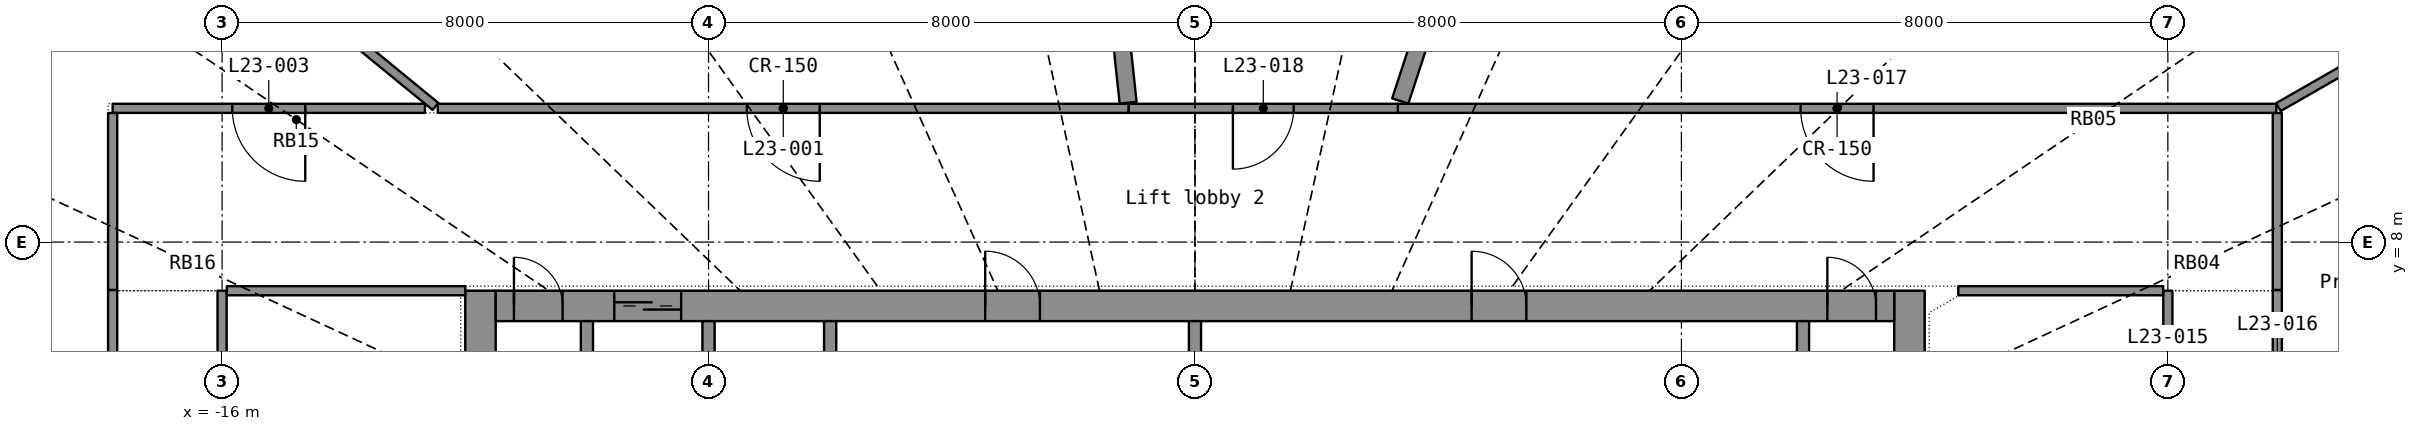
"""IFC4 building model, lengths in metres.
Left out: names, types, materials, properties, quantities, classifications, styles, units other than length and angle.
Written with IfcOpenShell. Run it as: python <this file> out.ifc"""

import sys

from ifc_helpers import new_model, si_unit, direction, frame, frame_2d, origin, place, context, subcontext, project, spatial, rectangle, extrude, element, fill, save


model = new_model("IFC4")
c1 = context("Model", 3, precision=1e-05, world=origin(), true_north=direction((0.0, 1.0)))
c2 = subcontext(c1, "Body", "Model", "MODEL_VIEW")
j1 = project(units=[si_unit("LENGTHUNIT", "METRE"), si_unit("PLANEANGLEUNIT", "RADIAN")], contexts=[c1])
p1 = place(None, origin())
s1 = spatial("IfcSite", under=j1, at=p1, CompositionType="ELEMENT")
p2 = place(p1, origin())
s2 = spatial("IfcBuilding", under=s1, at=p2, CompositionType="ELEMENT")
p3 = place(p2, frame((0.0, 0.0, 100.8)))
s3 = spatial("IfcBuildingStorey", under=s2, at=p3, CompositionType="ELEMENT", Elevation=100.8)
p4 = place(p3, frame((-11.75, -7.2, 0.0), z_axis=(0.0, 0.0, 1.0), x_axis=(0.0, 1.0, 0.0)))
e1 = element("IfcWall", 1, at=p4, inside=s3, PredefinedType="SHEAR", context=c2, shape_type="SweptSolid", body=[
    extrude(rectangle(XDim=14.4, YDim=0.5, at=frame_2d((7.2, 0.0))), origin(), (0.0, 0.0, 1.0), 3.3),
])
p5 = place(p4, frame((6.5, 0.0, 0.0)))
e2 = element("IfcOpeningElement", 2, at=p5, cuts=e1, PredefinedType="OPENING", context=c2, shape_type="SweptSolid", body=[
    extrude(rectangle(XDim=1.4, YDim=2.2, at=frame_2d((0.7, 1.1))), frame((0.0, 0.26, 0.0), z_axis=(0.0, -1.0, 0.0), x_axis=(1.0, 0.0, 0.0)), (0.0, 0.0, 1.0), 0.52),
])
p6 = place(p3, frame((11.75, -7.2, 0.0), z_axis=(0.0, 0.0, 1.0), x_axis=(0.0, 1.0, 0.0)))
e3 = element("IfcWall", 3, at=p6, inside=s3, PredefinedType="SHEAR", context=c2, shape_type="SweptSolid", body=[
    extrude(rectangle(XDim=14.4, YDim=0.5, at=frame_2d((7.2, 0.0))), origin(), (0.0, 0.0, 1.0), 3.3),
])
p7 = place(p6, frame((6.5, 0.0, 0.0)))
e4 = element("IfcOpeningElement", 4, at=p7, cuts=e3, PredefinedType="OPENING", context=c2, shape_type="SweptSolid", body=[
    extrude(rectangle(XDim=1.4, YDim=2.2, at=frame_2d((0.7, 1.1))), frame((0.0, 0.26, 0.0), z_axis=(0.0, -1.0, 0.0), x_axis=(1.0, 0.0, 0.0)), (0.0, 0.0, 1.0), 0.52),
])
p8 = place(p3, frame((-11.5, 6.95, 0.0), z_axis=(0.0, 0.0, 1.0), x_axis=(1.0, 0.0, 0.0)))
e5 = element("IfcWall", 5, at=p8, inside=s3, PredefinedType="SHEAR", context=c2, shape_type="SweptSolid", body=[
    extrude(rectangle(XDim=23.0, YDim=0.5, at=frame_2d((11.5, 0.0))), origin(), (0.0, 0.0, 1.0), 3.3),
])
p9 = place(p8, frame((1.95, 0.0, 0.0)))
e6 = element("IfcOpeningElement", 6, at=p9, cuts=e5, PredefinedType="OPENING", context=c2, shape_type="SweptSolid", body=[
    extrude(rectangle(XDim=1.1, YDim=2.2, at=frame_2d((0.55, 1.1))), frame((0.0, 0.26, 0.0), z_axis=(0.0, -1.0, 0.0), x_axis=(1.0, 0.0, 0.0)), (0.0, 0.0, 1.0), 0.52),
])
p10 = place(p8, frame((8.05, 0.0, 0.0)))
e7 = element("IfcOpeningElement", 7, at=p10, cuts=e5, PredefinedType="OPENING", context=c2, shape_type="SweptSolid", body=[
    extrude(rectangle(XDim=0.9, YDim=2.1, at=frame_2d((0.45, 1.05))), frame((0.0, 0.26, 0.0), z_axis=(0.0, -1.0, 0.0), x_axis=(1.0, 0.0, 0.0)), (0.0, 0.0, 1.0), 0.52),
])
p11 = place(p8, frame((16.05, 0.0, 0.0)))
e8 = element("IfcOpeningElement", 8, at=p11, cuts=e5, PredefinedType="OPENING", context=c2, shape_type="SweptSolid", body=[
    extrude(rectangle(XDim=0.9, YDim=2.1, at=frame_2d((0.45, 1.05))), frame((0.0, 0.26, 0.0), z_axis=(0.0, -1.0, 0.0), x_axis=(1.0, 0.0, 0.0)), (0.0, 0.0, 1.0), 0.52),
])
p12 = place(p8, frame((0.3, 0.0, 0.0)))
e9 = element("IfcOpeningElement", 9, at=p12, cuts=e5, PredefinedType="OPENING", context=c2, shape_type="SweptSolid", body=[
    extrude(rectangle(XDim=0.8, YDim=2.05, at=frame_2d((0.4, 1.025))), frame((0.0, 0.26, 0.0), z_axis=(0.0, -1.0, 0.0), x_axis=(1.0, 0.0, 0.0)), (0.0, 0.0, 1.0), 0.52),
])
p13 = place(p8, frame((21.9, 0.0, 0.0)))
e10 = element("IfcOpeningElement", 10, at=p13, cuts=e5, PredefinedType="OPENING", context=c2, shape_type="SweptSolid", body=[
    extrude(rectangle(XDim=0.8, YDim=2.05, at=frame_2d((0.4, 1.025))), frame((0.0, 0.26, 0.0), z_axis=(0.0, -1.0, 0.0), x_axis=(1.0, 0.0, 0.0)), (0.0, 0.0, 1.0), 0.52),
])
for number, where, z_axis, x_axis in (
    (11, (-10.0, 3.9, 0.0), (0.0, 0.0, 1.0), (0.0, 1.0, 0.0)),
    (12, (-8.0, 3.9, 0.0), (0.0, 0.0, 1.0), (0.0, 1.0, 0.0)),
    (13, (-6.0, 3.9, 0.0), (0.0, 0.0, 1.0), (0.0, 1.0, 0.0)),
    (14, (10.0, 3.9, 0.0), (0.0, 0.0, 1.0), (0.0, 1.0, 0.0)),
):
    element("IfcWall", number, at=place(p3, frame(where, z_axis=z_axis, x_axis=x_axis)), inside=s3, PredefinedType="SHEAR", context=c2, shape_type="SweptSolid", body=[
        extrude(rectangle(XDim=2.8, YDim=0.2, at=frame_2d((1.4, 0.0))), origin(), (0.0, 0.0, 1.0), 3.3),
    ])
p14 = place(p3, frame((0.0, 3.9, 0.0), z_axis=(0.0, 0.0, 1.0), x_axis=(0.0, 1.0, 0.0)))
e15 = element("IfcWall", 15, at=p14, inside=s3, PredefinedType="PARTITIONING", context=c2, shape_type="SweptSolid", body=[
    extrude(rectangle(XDim=2.8, YDim=0.2, at=frame_2d((1.4, 0.0))), origin(), (0.0, 0.0, 1.0), 3.3),
])
p15 = place(p3, frame((17.784, 10.2, 0.0), z_axis=(0.0, 0.0, 1.0), x_axis=(-1.0, 0.0, 0.0)))
e16 = element("IfcWall", 16, at=p15, inside=s3, PredefinedType="PARTITIONING", context=c2, shape_type="SweptSolid", body=[
    extrude(rectangle(XDim=14.447, YDim=0.15, at=frame_2d((7.224, 0.0))), origin(), (0.0, 0.0, 1.0), 2.4),
])
p16 = place(p15, frame((6.624, 0.0, 0.0)))
e17 = element("IfcOpeningElement", 17, at=p16, cuts=e16, PredefinedType="OPENING", context=c2, shape_type="SweptSolid", body=[
    extrude(rectangle(XDim=1.2, YDim=2.2, at=frame_2d((0.6, 1.1))), frame((0.0, 0.085, 0.0), z_axis=(0.0, -1.0, 0.0), x_axis=(1.0, 0.0, 0.0)), (0.0, 0.0, 1.0), 0.17),
])
p17 = place(p3, frame((-1.089, 10.2, 0.0), z_axis=(0.0, 0.0, 1.0), x_axis=(-1.0, 0.0, 0.0)))
e18 = element("IfcWall", 18, at=p17, inside=s3, PredefinedType="PARTITIONING", context=c2, shape_type="SweptSolid", body=[
    extrude(rectangle(XDim=11.363, YDim=0.15, at=frame_2d((5.682, 0.0))), origin(), (0.0, 0.0, 1.0), 2.4),
])
p18 = place(p17, frame((5.082, 0.0, 0.0)))
e19 = element("IfcOpeningElement", 19, at=p18, cuts=e18, PredefinedType="OPENING", context=c2, shape_type="SweptSolid", body=[
    extrude(rectangle(XDim=1.2, YDim=2.2, at=frame_2d((0.6, 1.1))), frame((0.0, 0.085, 0.0), z_axis=(0.0, -1.0, 0.0), x_axis=(1.0, 0.0, 0.0)), (0.0, 0.0, 1.0), 0.17),
])
p19 = place(p3, frame((-1.099, 10.292, 0.0), z_axis=(0.0, 0.0, 1.0), x_axis=(-0.106202827, 0.994344487, 0.0)))
e20 = element("IfcWall", 20, at=p19, inside=s3, PredefinedType="PARTITIONING", context=c2, shape_type="SweptSolid", body=[
    extrude(rectangle(XDim=10.857, YDim=0.28, at=frame_2d((5.429, 0.0))), origin(), (0.0, 0.0, 1.0), 2.4),
])
p20 = place(p19, frame((4.679, 0.0, 1.0)))
e21 = element("IfcOpeningElement", 21, at=p20, cuts=e20, PredefinedType="OPENING", context=c2, shape_type="SweptSolid", body=[
    extrude(rectangle(XDim=1.5, YDim=1.2, at=frame_2d((0.75, 0.6))), frame((0.0, 0.15, 0.0), z_axis=(0.0, -1.0, 0.0), x_axis=(1.0, 0.0, 0.0)), (0.0, 0.0, 1.0), 0.3),
])
p21 = place(p3, frame((6.689, 20.448, 0.0), z_axis=(0.0, 0.0, 1.0), x_axis=(-0.310888923, -0.950446252, 0.0)))
e22 = element("IfcWall", 22, at=p21, inside=s3, PredefinedType="PARTITIONING", context=c2, shape_type="SweptSolid", body=[
    extrude(rectangle(XDim=10.656, YDim=0.28, at=frame_2d((5.328, 0.0))), origin(), (0.0, 0.0, 1.0), 2.4),
])
p22 = place(p3, frame((-17.8, 7.212, 0.0), z_axis=(0.0, 0.0, 1.0), x_axis=(0.0, -1.0, 0.0)))
e23 = element("IfcWall", 23, at=p22, inside=s3, PredefinedType="PARTITIONING", context=c2, shape_type="SweptSolid", body=[
    extrude(rectangle(XDim=8.488, YDim=0.15, at=frame_2d((4.244, 0.0))), origin(), (0.0, 0.0, 1.0), 2.4),
])
p23 = place(p22, frame((3.644, 0.0, 0.0)))
e24 = element("IfcOpeningElement", 24, at=p23, cuts=e23, PredefinedType="OPENING", context=c2, shape_type="SweptSolid", body=[
    extrude(rectangle(XDim=1.2, YDim=2.2, at=frame_2d((0.6, 1.1))), frame((0.0, 0.085, 0.0), z_axis=(0.0, -1.0, 0.0), x_axis=(1.0, 0.0, 0.0)), (0.0, 0.0, 1.0), 0.17),
])
p24 = place(p3, frame((-18.283, 14.976, 0.0), z_axis=(0.0, 0.0, 1.0), x_axis=(0.773592541, -0.633683344, 0.0)))
e25 = element("IfcWall", 25, at=p24, inside=s3, PredefinedType="PARTITIONING", context=c2, shape_type="SweptSolid", body=[
    extrude(rectangle(XDim=7.488, YDim=0.15, at=frame_2d((3.744, 0.0))), origin(), (0.0, 0.0, 1.0), 2.4),
])
p25 = place(p3, frame((-16.0, 0.9, 0.0), z_axis=(0.0, 0.0, 1.0), x_axis=(0.0, 1.0, 0.0)))
e26 = element("IfcWall", 26, at=p25, inside=s3, PredefinedType="PARTITIONING", context=c2, shape_type="SweptSolid", body=[
    extrude(rectangle(XDim=6.3, YDim=0.15, at=frame_2d((3.15, 0.0))), origin(), (0.0, 0.0, 1.0), 2.4),
])
p26 = place(p25, frame((2.55, 0.0, 0.0)))
e27 = element("IfcOpeningElement", 27, at=p26, cuts=e26, PredefinedType="OPENING", context=c2, shape_type="SweptSolid", body=[
    extrude(rectangle(XDim=1.2, YDim=2.2, at=frame_2d((0.6, 1.1))), frame((0.0, 0.085, 0.0), z_axis=(0.0, -1.0, 0.0), x_axis=(1.0, 0.0, 0.0)), (0.0, 0.0, 1.0), 0.17),
])
p27 = place(p3, frame((-12.665, 10.2, 0.0), z_axis=(0.0, 0.0, 1.0), x_axis=(-1.0, 0.0, 0.0)))
e28 = element("IfcWall", 28, at=p27, inside=s3, PredefinedType="PARTITIONING", context=c2, shape_type="SweptSolid", body=[
    extrude(rectangle(XDim=5.135, YDim=0.15, at=frame_2d((2.568, 0.0))), origin(), (0.0, 0.0, 1.0), 2.4),
])
p28 = place(p27, frame((1.968, 0.0, 0.0)))
e29 = element("IfcOpeningElement", 29, at=p28, cuts=e28, PredefinedType="OPENING", context=c2, shape_type="SweptSolid", body=[
    extrude(rectangle(XDim=1.2, YDim=2.2, at=frame_2d((0.6, 1.1))), frame((0.0, 0.085, 0.0), z_axis=(0.0, -1.0, 0.0), x_axis=(1.0, 0.0, 0.0)), (0.0, 0.0, 1.0), 0.17),
])
p29 = place(p3, frame((3.336, 10.2, 0.0), z_axis=(0.0, 0.0, 1.0), x_axis=(-1.0, 0.0, 0.0)))
e30 = element("IfcWall", 30, at=p29, inside=s3, PredefinedType="PARTITIONING", context=c2, shape_type="SweptSolid", body=[
    extrude(rectangle(XDim=4.424, YDim=0.15, at=frame_2d((2.212, 0.0))), origin(), (0.0, 0.0, 1.0), 2.4),
])
p30 = place(p29, frame((1.712, 0.0, 0.0)))
e31 = element("IfcOpeningElement", 31, at=p30, cuts=e30, PredefinedType="OPENING", context=c2, shape_type="SweptSolid", body=[
    extrude(rectangle(XDim=1.0, YDim=2.2, at=frame_2d((0.5, 1.1))), frame((0.0, 0.085, 0.0), z_axis=(0.0, -1.0, 0.0), x_axis=(1.0, 0.0, 0.0)), (0.0, 0.0, 1.0), 0.17),
])
p31 = place(p3, frame((-15.923, 7.2, 0.0), z_axis=(0.0, 0.0, 1.0), x_axis=(1.0, 0.0, 0.0)))
e32 = element("IfcWall", 32, at=p31, inside=s3, PredefinedType="PARTITIONING", context=c2, shape_type="SweptSolid", body=[
    extrude(rectangle(XDim=3.923, YDim=0.15, at=frame_2d((1.961, 0.0))), origin(), (0.0, 0.0, 1.0), 2.4),
])
p32 = place(p3, frame((21.183, 12.149, 0.0), z_axis=(0.0, 0.0, 1.0), x_axis=(-0.867451833, -0.497521173, 0.0)))
e33 = element("IfcWall", 33, at=p32, inside=s3, PredefinedType="PARTITIONING", context=c2, shape_type="SweptSolid", body=[
    extrude(rectangle(XDim=3.879, YDim=0.15, at=frame_2d((1.939, 0.0))), origin(), (0.0, 0.0, 1.0), 2.4),
])
p33 = place(p3, frame((16.0, 7.2, 0.0), z_axis=(0.0, 0.0, 1.0), x_axis=(0.0, -1.0, 0.0)))
e34 = element("IfcWall", 34, at=p33, inside=s3, PredefinedType="PARTITIONING", context=c2, shape_type="SweptSolid", body=[
    extrude(rectangle(XDim=3.55, YDim=0.15, at=frame_2d((1.775, 0.0))), origin(), (0.0, 0.0, 1.0), 2.4),
])
p34 = place(p33, frame((1.3, 0.0, 0.0)))
e35 = element("IfcOpeningElement", 35, at=p34, cuts=e34, PredefinedType="OPENING", context=c2, shape_type="SweptSolid", body=[
    extrude(rectangle(XDim=0.95, YDim=2.15, at=frame_2d((0.475, 1.075))), frame((0.0, 0.085, 0.0), z_axis=(0.0, -1.0, 0.0), x_axis=(1.0, 0.0, 0.0)), (0.0, 0.0, 1.0), 0.17),
])
p35 = place(p3, frame((12.553, 7.2, 0.0), z_axis=(0.0, 0.0, 1.0), x_axis=(1.0, 0.0, 0.0)))
e36 = element("IfcWall", 36, at=p35, inside=s3, PredefinedType="PARTITIONING", context=c2, shape_type="SweptSolid", body=[
    extrude(rectangle(XDim=3.37, YDim=0.15, at=frame_2d((1.685, 0.0))), origin(), (0.0, 0.0, 1.0), 2.4),
])
p36 = place(p3, frame((17.8, 4.069, 0.0), z_axis=(0.0, 0.0, 1.0), x_axis=(0.0, 1.0, 0.0)))
e37 = element("IfcWall", 37, at=p36, inside=s3, PredefinedType="PARTITIONING", context=c2, shape_type="SweptSolid", body=[
    extrude(rectangle(XDim=3.143, YDim=0.15, at=frame_2d((1.572, 0.0))), origin(), (0.0, 0.0, 1.0), 2.4),
])
p37 = place(p36, frame((1.097, 0.0, 0.0)))
e38 = element("IfcOpeningElement", 38, at=p37, cuts=e37, PredefinedType="OPENING", context=c2, shape_type="SweptSolid", body=[
    extrude(rectangle(XDim=0.95, YDim=2.15, at=frame_2d((0.475, 1.075))), frame((0.0, 0.085, 0.0), z_axis=(0.0, -1.0, 0.0), x_axis=(1.0, 0.0, 0.0)), (0.0, 0.0, 1.0), 0.17),
])
for number, where, z_axis, x_axis in (
    (39, (17.8, 7.213, 0.0), (0.0, 0.0, 1.0), (0.0, 1.0, 0.0)),
    (40, (-17.8, 10.123, 0.0), (0.0, 0.0, 1.0), (0.0, -1.0, 0.0)),
):
    element("IfcWall", number, at=place(p3, frame(where, z_axis=z_axis, x_axis=x_axis)), inside=s3, PredefinedType="PARTITIONING", context=c2, shape_type="SweptSolid", body=[
        extrude(rectangle(XDim=2.91, YDim=0.15, at=frame_2d((1.455, 0.0))), origin(), (0.0, 0.0, 1.0), 2.4),
    ])
p38 = place(p9, origin())
e41 = element("IfcDoor", 41, at=p38, inside=s3, OperationType="DOUBLE_DOOR_SLIDING", PredefinedType="DOOR", context=c2, shape_type="SweptSolid", body=[
    extrude(rectangle(XDim=1.1, YDim=2.2, at=frame_2d((0.55, 1.1))), frame((0.0, 0.025, 0.0), z_axis=(0.0, -1.0, 0.0), x_axis=(1.0, 0.0, 0.0)), (0.0, 0.0, 1.0), 0.05),
])
fill(e6, e41)
p39 = place(p10, origin())
e42 = element("IfcDoor", 42, at=p39, inside=s3, OperationType="SINGLE_SWING_LEFT", PredefinedType="DOOR", context=c2, shape_type="SweptSolid", body=[
    extrude(rectangle(XDim=0.9, YDim=2.1, at=frame_2d((0.45, 1.05))), frame((0.0, 0.025, 0.0), z_axis=(0.0, -1.0, 0.0), x_axis=(1.0, 0.0, 0.0)), (0.0, 0.0, 1.0), 0.05),
])
fill(e7, e42)
p40 = place(p11, origin())
e43 = element("IfcDoor", 43, at=p40, inside=s3, OperationType="SINGLE_SWING_LEFT", PredefinedType="DOOR", context=c2, shape_type="SweptSolid", body=[
    extrude(rectangle(XDim=0.9, YDim=2.1, at=frame_2d((0.45, 1.05))), frame((0.0, 0.025, 0.0), z_axis=(0.0, -1.0, 0.0), x_axis=(1.0, 0.0, 0.0)), (0.0, 0.0, 1.0), 0.05),
])
fill(e8, e43)
p41 = place(p12, origin())
e44 = element("IfcDoor", 44, at=p41, inside=s3, OperationType="SINGLE_SWING_LEFT", PredefinedType="DOOR", context=c2, shape_type="SweptSolid", body=[
    extrude(rectangle(XDim=0.8, YDim=2.05, at=frame_2d((0.4, 1.025))), frame((0.0, 0.025, 0.0), z_axis=(0.0, -1.0, 0.0), x_axis=(1.0, 0.0, 0.0)), (0.0, 0.0, 1.0), 0.05),
])
fill(e9, e44)
p42 = place(p13, origin())
e45 = element("IfcDoor", 45, at=p42, inside=s3, OperationType="SINGLE_SWING_LEFT", PredefinedType="DOOR", context=c2, shape_type="SweptSolid", body=[
    extrude(rectangle(XDim=0.8, YDim=2.05, at=frame_2d((0.4, 1.025))), frame((0.0, 0.025, 0.0), z_axis=(0.0, -1.0, 0.0), x_axis=(1.0, 0.0, 0.0)), (0.0, 0.0, 1.0), 0.05),
])
fill(e10, e45)
p43 = place(p18, origin())
e46 = element("IfcDoor", 46, at=p43, inside=s3, OperationType="DOUBLE_DOOR_SINGLE_SWING", PredefinedType="DOOR", context=c2, shape_type="SweptSolid", body=[
    extrude(rectangle(XDim=1.2, YDim=2.2, at=frame_2d((0.6, 1.1))), frame((0.0, 0.025, 0.0), z_axis=(0.0, -1.0, 0.0), x_axis=(1.0, 0.0, 0.0)), (0.0, 0.0, 1.0), 0.05),
])
fill(e19, e46)
p44 = place(p28, origin())
e47 = element("IfcDoor", 47, at=p44, inside=s3, OperationType="DOUBLE_DOOR_SINGLE_SWING", PredefinedType="DOOR", context=c2, shape_type="SweptSolid", body=[
    extrude(rectangle(XDim=1.2, YDim=2.2, at=frame_2d((0.6, 1.1))), frame((0.0, 0.025, 0.0), z_axis=(0.0, -1.0, 0.0), x_axis=(1.0, 0.0, 0.0)), (0.0, 0.0, 1.0), 0.05),
])
fill(e29, e47)
p45 = place(p16, origin())
e48 = element("IfcDoor", 48, at=p45, inside=s3, OperationType="DOUBLE_DOOR_SINGLE_SWING", PredefinedType="DOOR", context=c2, shape_type="SweptSolid", body=[
    extrude(rectangle(XDim=1.2, YDim=2.2, at=frame_2d((0.6, 1.1))), frame((0.0, 0.025, 0.0), z_axis=(0.0, -1.0, 0.0), x_axis=(1.0, 0.0, 0.0)), (0.0, 0.0, 1.0), 0.05),
])
fill(e17, e48)
p46 = place(p30, origin())
e49 = element("IfcDoor", 49, at=p46, inside=s3, OperationType="SINGLE_SWING_RIGHT", PredefinedType="DOOR", context=c2, shape_type="SweptSolid", body=[
    extrude(rectangle(XDim=1.0, YDim=2.2, at=frame_2d((0.5, 1.1))), frame((0.0, 0.025, 0.0), z_axis=(0.0, -1.0, 0.0), x_axis=(1.0, 0.0, 0.0)), (0.0, 0.0, 1.0), 0.05),
])
fill(e31, e49)
save(model, sys.argv[1])
